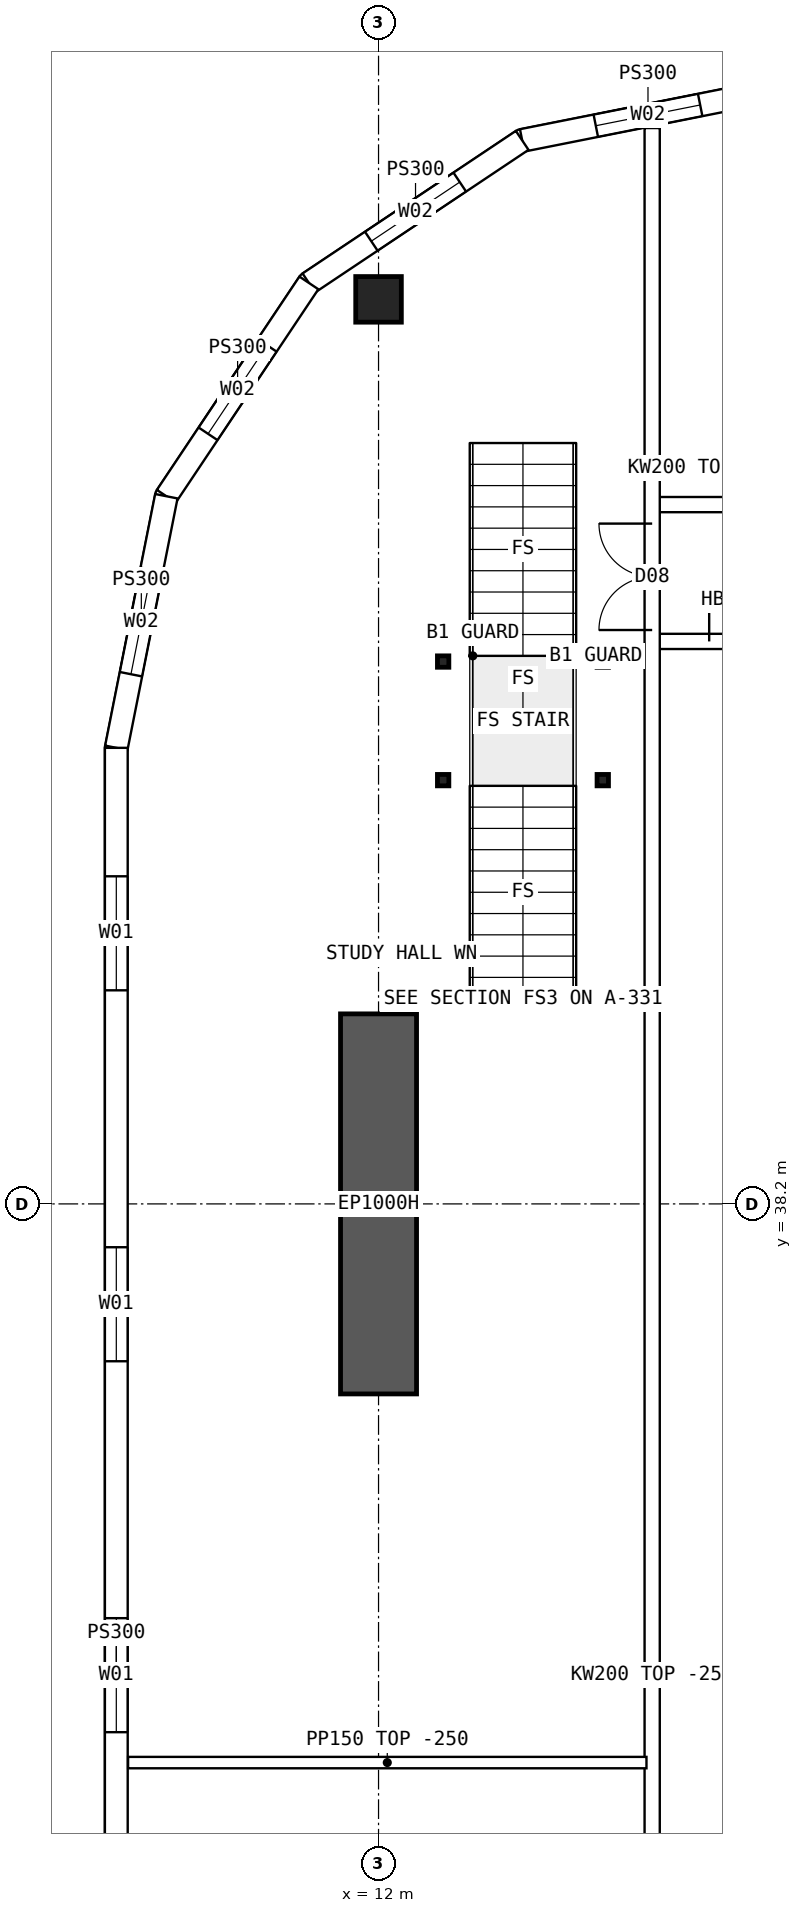
"""IFC4 building model, lengths in metres.
Left out: names, types, materials, properties, quantities, classifications, styles, units other than length and angle.
Written with IfcOpenShell. Run it as: python <this file> out.ifc"""

import sys

from ifc_helpers import new_model, si_unit, direction, frame, frame_2d, origin, origin_2d, place, context, subcontext, project, spatial, polyline, rectangle, hollow_rectangle, outline, extrude, element, fill, save


model = new_model("IFC4")
c1 = context("Model", 3, precision=1e-05, world=origin(), true_north=direction((0.0, 1.0)))
c2 = subcontext(c1, "Body", "Model", "MODEL_VIEW")
j1 = project(units=[si_unit("LENGTHUNIT", "METRE"), si_unit("PLANEANGLEUNIT", "RADIAN")], contexts=[c1])
p1 = place(None, origin())
s1 = spatial("IfcSite", under=j1, at=p1, CompositionType="ELEMENT")
p2 = place(p1, origin())
s2 = spatial("IfcBuilding", under=s1, at=p2, CompositionType="ELEMENT")
p3 = place(p2, frame((0.0, 0.0, 246.55)))
s3 = spatial("IfcBuildingStorey", under=s2, at=p3, CompositionType="ELEMENT", Elevation=246.55)
p4 = place(p3, frame((12.0, 50.1, 0.0), z_axis=(0.0, 0.0, 1.0), x_axis=(1.0, 0.0, 0.0)))
e1 = element("IfcColumn", 1, at=p4, inside=s3, PredefinedType="COLUMN", context=c2, shape_type="SweptSolid", body=[
    extrude(hollow_rectangle(XDim=0.6, YDim=0.6, WallThickness=0.06, at=origin_2d()), origin(), (0.0, 0.0, 1.0), 3.75),
])
p5 = place(p3, frame((12.0, 35.7, 0.0), z_axis=(0.0, 0.0, 1.0), x_axis=(0.0, 1.0, 0.0)))
e2 = element("IfcWall", 2, at=p5, inside=s3, PredefinedType="SHEAR", context=c2, shape_type="SweptSolid", body=[
    extrude(rectangle(XDim=5.0, YDim=1.0, at=frame_2d((2.5, 0.0))), origin(), (0.0, 0.0, 1.0), 3.75),
])
p6 = place(p3, frame((8.55, 44.2, 0.0), z_axis=(0.0, 0.0, 1.0), x_axis=(0.0, -1.0, 0.0)))
e3 = element("IfcWall", 3, at=p6, inside=s3, PredefinedType="SOLIDWALL", context=c2, shape_type="SweptSolid", body=[
    extrude(outline(polyline([(-0.015, -0.15), (24.415, -0.15), (24.385, 0.15), (0.015, 0.15), (-0.015, -0.15)])), origin(), (0.0, 0.0, 1.0), 3.5),
])
p7 = place(p6, frame((1.69, 0.0, 0.9)))
e4 = element("IfcOpeningElement", 4, at=p7, cuts=e3, PredefinedType="OPENING", context=c2, shape_type="SweptSolid", body=[
    extrude(rectangle(XDim=1.5, YDim=2.0, at=frame_2d((0.75, 1.0))), frame((0.0, 0.16, 0.0), z_axis=(0.0, -1.0, 0.0), x_axis=(1.0, 0.0, 0.0)), (0.0, 0.0, 1.0), 0.32),
])
p8 = place(p6, frame((6.57, 0.0, 0.9)))
e5 = element("IfcOpeningElement", 5, at=p8, cuts=e3, PredefinedType="OPENING", context=c2, shape_type="SweptSolid", body=[
    extrude(rectangle(XDim=1.5, YDim=2.0, at=frame_2d((0.75, 1.0))), frame((0.0, 0.16, 0.0), z_axis=(0.0, -1.0, 0.0), x_axis=(1.0, 0.0, 0.0)), (0.0, 0.0, 1.0), 0.32),
])
p9 = place(p6, frame((11.45, 0.0, 0.9)))
e6 = element("IfcOpeningElement", 6, at=p9, cuts=e3, PredefinedType="OPENING", context=c2, shape_type="SweptSolid", body=[
    extrude(rectangle(XDim=1.5, YDim=2.0, at=frame_2d((0.75, 1.0))), frame((0.0, 0.16, 0.0), z_axis=(0.0, -1.0, 0.0), x_axis=(1.0, 0.0, 0.0)), (0.0, 0.0, 1.0), 0.32),
])
p10 = place(p6, frame((16.33, 0.0, 0.9)))
e7 = element("IfcOpeningElement", 7, at=p10, cuts=e3, PredefinedType="OPENING", context=c2, shape_type="SweptSolid", body=[
    extrude(rectangle(XDim=1.5, YDim=2.0, at=frame_2d((0.75, 1.0))), frame((0.0, 0.16, 0.0), z_axis=(0.0, -1.0, 0.0), x_axis=(1.0, 0.0, 0.0)), (0.0, 0.0, 1.0), 0.32),
])
p11 = place(p6, frame((21.21, 0.0, 0.9)))
e8 = element("IfcOpeningElement", 8, at=p11, cuts=e3, PredefinedType="OPENING", context=c2, shape_type="SweptSolid", body=[
    extrude(rectangle(XDim=1.5, YDim=2.0, at=frame_2d((0.75, 1.0))), frame((0.0, 0.16, 0.0), z_axis=(0.0, -1.0, 0.0), x_axis=(1.0, 0.0, 0.0)), (0.0, 0.0, 1.0), 0.32),
])
p12 = place(p3, frame((17.2, 52.85, 0.0), z_axis=(0.0, 0.0, 1.0), x_axis=(-0.98078325777, -0.195100490205, 0.0)))
e9 = element("IfcWall", 9, at=p12, inside=s3, PredefinedType="SOLIDWALL", context=c2, shape_type="SweptSolid", body=[
    extrude(outline(polyline([(-0.03, -0.15), (3.405, -0.15), (3.345, 0.15), (0.03, 0.15), (-0.03, -0.15)])), origin(), (0.0, 0.0, 1.0), 3.5),
])
p13 = place(p12, frame((0.988, 0.0, 0.9)))
e10 = element("IfcOpeningElement", 10, at=p13, cuts=e9, PredefinedType="OPENING", context=c2, shape_type="SweptSolid", body=[
    extrude(rectangle(XDim=1.4, YDim=1.8, at=frame_2d((0.7, 0.9))), frame((0.0, 0.16, 0.0), z_axis=(0.0, -1.0, 0.0), x_axis=(1.0, 0.0, 0.0)), (0.0, 0.0, 1.0), 0.32),
])
p14 = place(p3, frame((13.89, 52.192, 0.0), z_axis=(0.0, 0.0, 1.0), x_axis=(-0.831460037396, -0.555584562613, 0.0)))
e11 = element("IfcWall", 11, at=p14, inside=s3, PredefinedType="SOLIDWALL", context=c2, shape_type="SweptSolid", body=[
    extrude(outline(polyline([(-0.03, -0.15), (3.405, -0.15), (3.345, 0.15), (0.03, 0.15), (-0.03, -0.15)])), origin(), (0.0, 0.0, 1.0), 3.5),
])
p15 = place(p14, frame((0.988, 0.0, 0.9)))
e12 = element("IfcOpeningElement", 12, at=p15, cuts=e11, PredefinedType="OPENING", context=c2, shape_type="SweptSolid", body=[
    extrude(rectangle(XDim=1.4, YDim=1.8, at=frame_2d((0.7, 0.9))), frame((0.0, 0.16, 0.0), z_axis=(0.0, -1.0, 0.0), x_axis=(1.0, 0.0, 0.0)), (0.0, 0.0, 1.0), 0.32),
])
p16 = place(p3, frame((11.083, 50.316, 0.0), z_axis=(0.0, 0.0, 1.0), x_axis=(-0.555567969291, -0.831471124873, 0.0)))
e13 = element("IfcWall", 13, at=p16, inside=s3, PredefinedType="SOLIDWALL", context=c2, shape_type="SweptSolid", body=[
    extrude(outline(polyline([(-0.03, -0.15), (3.405, -0.15), (3.345, 0.15), (0.03, 0.15), (-0.03, -0.15)])), origin(), (0.0, 0.0, 1.0), 3.5),
])
p17 = place(p16, frame((0.988, 0.0, 0.9)))
e14 = element("IfcOpeningElement", 14, at=p17, cuts=e13, PredefinedType="OPENING", context=c2, shape_type="SweptSolid", body=[
    extrude(rectangle(XDim=1.4, YDim=1.8, at=frame_2d((0.7, 0.9))), frame((0.0, 0.16, 0.0), z_axis=(0.0, -1.0, 0.0), x_axis=(1.0, 0.0, 0.0)), (0.0, 0.0, 1.0), 0.32),
])
p18 = place(p3, frame((9.208, 47.51, 0.0), z_axis=(0.0, 0.0, 1.0), x_axis=(-0.19508664885, -0.980786011034, 0.0)))
e15 = element("IfcWall", 15, at=p18, inside=s3, PredefinedType="SOLIDWALL", context=c2, shape_type="SweptSolid", body=[
    extrude(outline(polyline([(-0.03, -0.15), (3.39, -0.15), (3.36, 0.15), (0.03, 0.15), (-0.03, -0.15)])), origin(), (0.0, 0.0, 1.0), 3.5),
])
p19 = place(p18, frame((0.988, 0.0, 0.9)))
e16 = element("IfcOpeningElement", 16, at=p19, cuts=e15, PredefinedType="OPENING", context=c2, shape_type="SweptSolid", body=[
    extrude(rectangle(XDim=1.4, YDim=1.8, at=frame_2d((0.7, 0.9))), frame((0.0, 0.16, 0.0), z_axis=(0.0, -1.0, 0.0), x_axis=(1.0, 0.0, 0.0)), (0.0, 0.0, 1.0), 0.32),
])
p20 = place(p3, frame((15.6, 47.4, 0.0), z_axis=(0.0, 0.0, 1.0), x_axis=(1.0, 0.0, 0.0)))
e17 = element("IfcWall", 17, at=p20, inside=s3, PredefinedType="SOLIDWALL", context=c2, shape_type="SweptSolid", body=[
    extrude(rectangle(XDim=2.05, YDim=0.2, at=frame_2d((1.025, 0.0))), origin(), (0.0, 0.0, 1.0), 3.5),
])
p21 = place(p20, frame((0.95, 0.0, 0.0)))
e18 = element("IfcOpeningElement", 18, at=p21, cuts=e17, PredefinedType="OPENING", context=c2, shape_type="SweptSolid", body=[
    extrude(rectangle(XDim=0.9, YDim=2.1, at=frame_2d((0.45, 1.05))), frame((0.0, 0.11, 0.0), z_axis=(0.0, -1.0, 0.0), x_axis=(1.0, 0.0, 0.0)), (0.0, 0.0, 1.0), 0.22),
])
p22 = place(p3, frame((15.6, 45.6, 0.0), z_axis=(0.0, 0.0, 1.0), x_axis=(1.0, 0.0, 0.0)))
e19 = element("IfcWall", 19, at=p22, inside=s3, PredefinedType="SOLIDWALL", context=c2, shape_type="SweptSolid", body=[
    extrude(rectangle(XDim=2.05, YDim=0.2, at=frame_2d((1.025, 0.0))), origin(), (0.0, 0.0, 1.0), 3.5),
])
p23 = place(p22, frame((0.75, 0.0, 0.0)))
e20 = element("IfcOpeningElement", 20, at=p23, cuts=e19, PredefinedType="OPENING", context=c2, shape_type="SweptSolid", body=[
    extrude(rectangle(XDim=1.2, YDim=2.1, at=frame_2d((0.6, 1.05))), frame((0.0, 0.11, 0.0), z_axis=(0.0, -1.0, 0.0), x_axis=(1.0, 0.0, 0.0)), (0.0, 0.0, 1.0), 0.22),
])
p24 = place(p3, frame((8.705, 30.85, 0.0), z_axis=(0.0, 0.0, 1.0), x_axis=(1.0, 0.0, 0.0)))
e21 = element("IfcWall", 21, at=p24, inside=s3, PredefinedType="PARTITIONING", context=c2, shape_type="SweptSolid", body=[
    extrude(outline(polyline([(0.0, 0.0), (6.82, 0.0), (6.82, 3.5), (3.597, 3.5), (3.595, 3.05), (2.997, 3.05), (2.995, 3.5), (0.0, 3.5), (0.0, 0.0)])), frame((0.0, 0.075, 0.0), z_axis=(0.0, -1.0, 0.0), x_axis=(1.0, 0.0, 0.0)), (0.0, 0.0, 1.0), 0.15),
])
p25 = place(p3, frame((15.6, 11.646, 0.0), z_axis=(0.0, 0.0, 1.0), x_axis=(0.0, 1.0, 0.0)))
e22 = element("IfcWall", 22, at=p25, inside=s3, PredefinedType="SOLIDWALL", context=c2, shape_type="SweptSolid", body=[
    extrude(rectangle(XDim=40.708, YDim=0.2, at=frame_2d((20.354, 0.0))), origin(), (0.0, 0.0, 1.0), 3.5),
])
p26 = place(p25, frame((5.104, 0.0, 0.0)))
e23 = element("IfcOpeningElement", 23, at=p26, cuts=e22, PredefinedType="OPENING", context=c2, shape_type="SweptSolid", body=[
    extrude(rectangle(XDim=1.4, YDim=2.1, at=frame_2d((0.7, 1.05))), frame((0.0, 0.11, 0.0), z_axis=(0.0, -1.0, 0.0), x_axis=(1.0, 0.0, 0.0)), (0.0, 0.0, 1.0), 0.22),
])
p27 = place(p25, frame((34.104, 0.0, 0.0)))
e24 = element("IfcOpeningElement", 24, at=p27, cuts=e22, PredefinedType="OPENING", context=c2, shape_type="SweptSolid", body=[
    extrude(rectangle(XDim=1.4, YDim=2.1, at=frame_2d((0.7, 1.05))), frame((0.0, 0.11, 0.0), z_axis=(0.0, -1.0, 0.0), x_axis=(1.0, 0.0, 0.0)), (0.0, 0.0, 1.0), 0.22),
])
for number, where, z_axis, x_axis in (
    (25, (12.85, 43.775, 0.0), (0.0, 0.0, 1.0), (1.0, 0.0, 0.0)),
    (26, (14.95, 43.775, 0.0), (0.0, 0.0, 1.0), (1.0, 0.0, 0.0)),
    (27, (12.85, 45.335, 0.0), (0.0, 0.0, 1.0), (1.0, 0.0, 0.0)),
    (28, (14.95, 45.335, 0.0), (0.0, 0.0, 1.0), (1.0, 0.0, 0.0)),
):
    element("IfcColumn", number, at=place(p3, frame(where, z_axis=z_axis, x_axis=x_axis)), inside=s3, PredefinedType="COLUMN", context=c2, shape_type="SweptSolid", body=[
        extrude(hollow_rectangle(XDim=0.15, YDim=0.15, WallThickness=0.008, at=origin_2d()), origin(), (0.0, 0.0, 1.0), 3.5),
    ])
p28 = place(p7, origin())
e29 = element("IfcWindow", 29, at=p28, inside=s3, PartitioningType="SINGLE_PANEL", PredefinedType="WINDOW", context=c2, shape_type="SweptSolid", body=[
    extrude(rectangle(XDim=1.5, YDim=2.0, at=frame_2d((0.75, 1.0))), frame((0.0, 0.03, 0.0), z_axis=(0.0, -1.0, 0.0), x_axis=(1.0, 0.0, 0.0)), (0.0, 0.0, 1.0), 0.06),
])
fill(e4, e29)
p29 = place(p8, origin())
e30 = element("IfcWindow", 30, at=p29, inside=s3, PartitioningType="SINGLE_PANEL", PredefinedType="WINDOW", context=c2, shape_type="SweptSolid", body=[
    extrude(rectangle(XDim=1.5, YDim=2.0, at=frame_2d((0.75, 1.0))), frame((0.0, 0.03, 0.0), z_axis=(0.0, -1.0, 0.0), x_axis=(1.0, 0.0, 0.0)), (0.0, 0.0, 1.0), 0.06),
])
fill(e5, e30)
p30 = place(p9, origin())
e31 = element("IfcWindow", 31, at=p30, inside=s3, PartitioningType="SINGLE_PANEL", PredefinedType="WINDOW", context=c2, shape_type="SweptSolid", body=[
    extrude(rectangle(XDim=1.5, YDim=2.0, at=frame_2d((0.75, 1.0))), frame((0.0, 0.03, 0.0), z_axis=(0.0, -1.0, 0.0), x_axis=(1.0, 0.0, 0.0)), (0.0, 0.0, 1.0), 0.06),
])
fill(e6, e31)
p31 = place(p13, origin())
e32 = element("IfcWindow", 32, at=p31, inside=s3, PartitioningType="SINGLE_PANEL", PredefinedType="WINDOW", context=c2, shape_type="SweptSolid", body=[
    extrude(rectangle(XDim=1.4, YDim=1.8, at=frame_2d((0.7, 0.9))), frame((0.0, 0.03, 0.0), z_axis=(0.0, -1.0, 0.0), x_axis=(1.0, 0.0, 0.0)), (0.0, 0.0, 1.0), 0.06),
])
fill(e10, e32)
p32 = place(p15, origin())
e33 = element("IfcWindow", 33, at=p32, inside=s3, PartitioningType="SINGLE_PANEL", PredefinedType="WINDOW", context=c2, shape_type="SweptSolid", body=[
    extrude(rectangle(XDim=1.4, YDim=1.8, at=frame_2d((0.7, 0.9))), frame((0.0, 0.03, 0.0), z_axis=(0.0, -1.0, 0.0), x_axis=(1.0, 0.0, 0.0)), (0.0, 0.0, 1.0), 0.06),
])
fill(e12, e33)
p33 = place(p17, origin())
e34 = element("IfcWindow", 34, at=p33, inside=s3, PartitioningType="SINGLE_PANEL", PredefinedType="WINDOW", context=c2, shape_type="SweptSolid", body=[
    extrude(rectangle(XDim=1.4, YDim=1.8, at=frame_2d((0.7, 0.9))), frame((0.0, 0.03, 0.0), z_axis=(0.0, -1.0, 0.0), x_axis=(1.0, 0.0, 0.0)), (0.0, 0.0, 1.0), 0.06),
])
fill(e14, e34)
p34 = place(p19, origin())
e35 = element("IfcWindow", 35, at=p34, inside=s3, PartitioningType="SINGLE_PANEL", PredefinedType="WINDOW", context=c2, shape_type="SweptSolid", body=[
    extrude(rectangle(XDim=1.4, YDim=1.8, at=frame_2d((0.7, 0.9))), frame((0.0, 0.03, 0.0), z_axis=(0.0, -1.0, 0.0), x_axis=(1.0, 0.0, 0.0)), (0.0, 0.0, 1.0), 0.06),
])
fill(e16, e35)
p35 = place(p23, origin())
e36 = element("IfcDoor", 36, at=p35, inside=s3, OperationType="DOUBLE_DOOR_SINGLE_SWING", PredefinedType="DOOR", context=c2, shape_type="SweptSolid", body=[
    extrude(rectangle(XDim=1.2, YDim=2.1, at=frame_2d((0.6, 1.05))), frame((0.0, 0.025, 0.0), z_axis=(0.0, -1.0, 0.0), x_axis=(1.0, 0.0, 0.0)), (0.0, 0.0, 1.0), 0.05),
])
fill(e20, e36)
p36 = place(p27, origin())
e37 = element("IfcDoor", 37, at=p36, inside=s3, OperationType="DOUBLE_DOOR_SINGLE_SWING", PredefinedType="DOOR", context=c2, shape_type="SweptSolid", body=[
    extrude(rectangle(XDim=1.4, YDim=2.1, at=frame_2d((0.7, 1.05))), frame((0.0, 0.025, 0.0), z_axis=(0.0, -1.0, 0.0), x_axis=(1.0, 0.0, 0.0)), (0.0, 0.0, 1.0), 0.05),
])
fill(e24, e37)
save(model, sys.argv[1])
